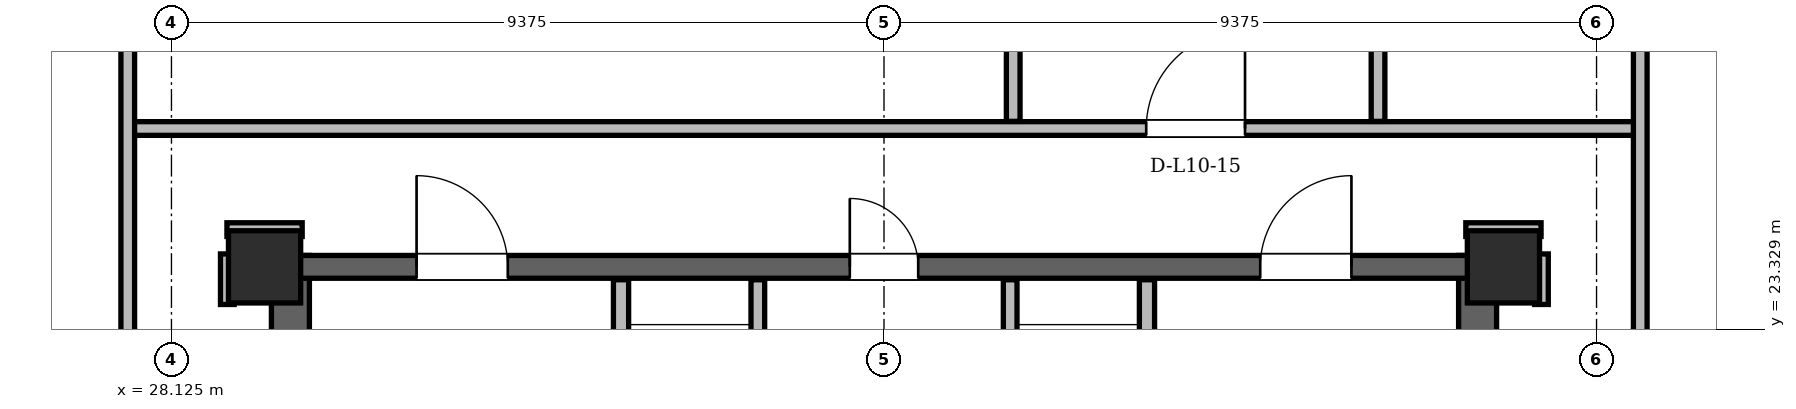
"""IFC4 building model, lengths in metres.
Left out: names, types, materials, properties, quantities, classifications, styles, units other than length and angle.
Written with IfcOpenShell. Run it as: python <this file> out.ifc"""

import sys

from ifc_helpers import new_model, si_unit, direction, frame, frame_2d, origin, origin_2d, place, context, subcontext, project, spatial, rectangle, hollow_rectangle, extrude, element, fill, save


model = new_model("IFC4")
c1 = context("Model", 3, precision=1e-05, world=origin(), true_north=direction((0.0, 1.0)))
c2 = subcontext(c1, "Body", "Model", "MODEL_VIEW")
j1 = project(units=[si_unit("LENGTHUNIT", "METRE"), si_unit("PLANEANGLEUNIT", "RADIAN")], contexts=[c1])
p1 = place(None, origin())
s1 = spatial("IfcSite", under=j1, at=p1, CompositionType="ELEMENT")
p2 = place(p1, origin())
s2 = spatial("IfcBuilding", under=s1, at=p2, CompositionType="ELEMENT")
p3 = place(p2, frame((0.0, 0.0, 41.7)))
s3 = spatial("IfcBuildingStorey", under=s2, at=p3, CompositionType="ELEMENT", Elevation=41.7)
for number, where, z_axis, x_axis in (
    (1, (45.65, 24.15, 0.0), (0.0, 0.0, 1.0), (1.0, 0.0, 0.0)),
    (2, (29.35, 24.15, 0.0), (0.0, 0.0, 1.0), (1.0, 0.0, 0.0)),
):
    element("IfcColumn", number, at=place(p3, frame(where, z_axis=z_axis, x_axis=x_axis)), inside=s3, PredefinedType="COLUMN", context=c2, shape_type="SweptSolid", body=[
        extrude(hollow_rectangle(XDim=0.95, YDim=0.95, WallThickness=0.08, at=origin_2d()), origin(), (0.0, 0.0, 1.0), 3.6),
    ])
for number, where, z_axis, x_axis in (
    (3, (29.69, 11.0, 0.0), (0.0, 0.0, 1.0), (0.0, 1.0, 0.0)),
    (4, (45.31, 11.0, 0.0), (0.0, 0.0, 1.0), (0.0, 1.0, 0.0)),
):
    element("IfcWall", number, at=place(p3, frame(where, z_axis=z_axis, x_axis=x_axis)), inside=s3, PredefinedType="SHEAR", context=c2, shape_type="SweptSolid", body=[
        extrude(rectangle(XDim=13.3, YDim=0.5, at=frame_2d((6.65, 0.0))), origin(), (0.0, 0.0, 1.0), 3.36),
    ])
p4 = place(p3, frame((29.65, 24.15, 0.0), z_axis=(0.0, 0.0, 1.0), x_axis=(1.0, 0.0, 0.0)))
e5 = element("IfcWall", 5, at=p4, inside=s3, PredefinedType="SHEAR", context=c2, shape_type="SweptSolid", body=[
    extrude(rectangle(XDim=15.7, YDim=0.3, at=frame_2d((7.85, 0.0))), origin(), (0.0, 0.0, 1.0), 3.36),
])
p5 = place(p4, frame((1.7, 0.0, 0.0)))
e6 = element("IfcOpeningElement", 6, at=p5, cuts=e5, PredefinedType="OPENING", context=c2, shape_type="SweptSolid", body=[
    extrude(rectangle(XDim=1.2, YDim=2.2, at=frame_2d((0.6, 1.1))), frame((0.0, 0.15, 0.0), z_axis=(0.0, -1.0, 0.0), x_axis=(1.0, 0.0, 0.0)), (0.0, 0.0, 1.0), 0.3),
])
p6 = place(p4, frame((12.8, 0.0, 0.0)))
e7 = element("IfcOpeningElement", 7, at=p6, cuts=e5, PredefinedType="OPENING", context=c2, shape_type="SweptSolid", body=[
    extrude(rectangle(XDim=1.2, YDim=2.2, at=frame_2d((0.6, 1.1))), frame((0.0, 0.15, 0.0), z_axis=(0.0, -1.0, 0.0), x_axis=(1.0, 0.0, 0.0)), (0.0, 0.0, 1.0), 0.3),
])
p7 = place(p4, frame((7.4, 0.0, 0.0)))
e8 = element("IfcOpeningElement", 8, at=p7, cuts=e5, PredefinedType="OPENING", context=c2, shape_type="SweptSolid", body=[
    extrude(rectangle(XDim=0.9, YDim=2.05, at=frame_2d((0.45, 1.025))), frame((0.0, 0.15, 0.0), z_axis=(0.0, -1.0, 0.0), x_axis=(1.0, 0.0, 0.0)), (0.0, 0.0, 1.0), 0.3),
])
p8 = place(p3, frame((61.648, 14.921, 0.0), z_axis=(0.0, 0.0, 1.0), x_axis=(-0.500002585961, 0.866023910774, 0.0)))
e9 = element("IfcWall", 9, at=p8, inside=s3, PredefinedType="SOLIDWALL", context=c2, shape_type="SweptSolid", body=[
    extrude(rectangle(XDim=33.118, YDim=0.34, at=frame_2d((16.559, 0.0))), origin(), (0.0, 0.0, 1.0), 2.494),
])
p9 = place(p8, frame((7.0, 0.0, 0.0)))
e10 = element("IfcOpeningElement", 10, at=p9, cuts=e9, PredefinedType="OPENING", context=c2, shape_type="SweptSolid", body=[
    extrude(rectangle(XDim=1.5, YDim=2.2, at=frame_2d((0.75, 1.1))), frame((0.0, 0.17, 0.0), z_axis=(0.0, -1.0, 0.0), x_axis=(1.0, 0.0, 0.0)), (0.0, 0.0, 1.0), 0.34),
])
p10 = place(p8, frame((24.004, 0.0, 0.0)))
e11 = element("IfcOpeningElement", 11, at=p10, cuts=e9, PredefinedType="OPENING", context=c2, shape_type="SweptSolid", body=[
    extrude(rectangle(XDim=1.5, YDim=2.2, at=frame_2d((0.75, 1.1))), frame((0.0, 0.17, 0.0), z_axis=(0.0, -1.0, 0.0), x_axis=(1.0, 0.0, 0.0)), (0.0, 0.0, 1.0), 0.34),
])
p11 = place(p8, frame((1.324, 0.0, 0.85)))
e12 = element("IfcOpeningElement", 12, at=p11, cuts=e9, PredefinedType="OPENING", context=c2, shape_type="SweptSolid", body=[
    extrude(rectangle(XDim=2.5, YDim=1.534, at=frame_2d((1.25, 0.767))), frame((0.0, 0.17, 0.0), z_axis=(0.0, -1.0, 0.0), x_axis=(1.0, 0.0, 0.0)), (0.0, 0.0, 1.0), 0.34),
])
p12 = place(p8, frame((17.011, 0.0, 0.85)))
e13 = element("IfcOpeningElement", 13, at=p12, cuts=e9, PredefinedType="OPENING", context=c2, shape_type="SweptSolid", body=[
    extrude(rectangle(XDim=2.8, YDim=1.534, at=frame_2d((1.4, 0.767))), frame((0.0, 0.17, 0.0), z_axis=(0.0, -1.0, 0.0), x_axis=(1.0, 0.0, 0.0)), (0.0, 0.0, 1.0), 0.34),
])
p13 = place(p8, frame((25.84, 0.0, 0.85)))
e14 = element("IfcOpeningElement", 14, at=p13, cuts=e9, PredefinedType="OPENING", context=c2, shape_type="SweptSolid", body=[
    extrude(rectangle(XDim=1.2, YDim=1.48, at=frame_2d((0.6, 0.74))), frame((0.0, 0.17, 0.0), z_axis=(0.0, -1.0, 0.0), x_axis=(1.0, 0.0, 0.0)), (0.0, 0.0, 1.0), 0.34),
])
p14 = place(p8, frame((10.758, 0.0, 0.85)))
e15 = element("IfcOpeningElement", 15, at=p14, cuts=e9, PredefinedType="OPENING", context=c2, shape_type="SweptSolid", body=[
    extrude(rectangle(XDim=1.2, YDim=1.48, at=frame_2d((0.6, 0.74))), frame((0.0, 0.17, 0.0), z_axis=(0.0, -1.0, 0.0), x_axis=(1.0, 0.0, 0.0)), (0.0, 0.0, 1.0), 0.34),
])
p15 = place(p8, frame((13.246, 0.0, 0.85)))
e16 = element("IfcOpeningElement", 16, at=p15, cuts=e9, PredefinedType="OPENING", context=c2, shape_type="SweptSolid", body=[
    extrude(rectangle(XDim=1.8, YDim=1.534, at=frame_2d((0.9, 0.767))), frame((0.0, 0.17, 0.0), z_axis=(0.0, -1.0, 0.0), x_axis=(1.0, 0.0, 0.0)), (0.0, 0.0, 1.0), 0.34),
])
p16 = place(p3, frame((29.911, 43.603, 0.0), z_axis=(0.0, 0.0, 1.0), x_axis=(-0.500002585961, -0.866023910774, 0.0)))
e17 = element("IfcWall", 17, at=p16, inside=s3, PredefinedType="SOLIDWALL", context=c2, shape_type="SweptSolid", body=[
    extrude(rectangle(XDim=33.118, YDim=0.34, at=frame_2d((16.559, 0.0))), origin(), (0.0, 0.0, 1.0), 2.494),
])
p17 = place(p16, frame((6.369, 0.0, 0.0)))
e18 = element("IfcOpeningElement", 18, at=p17, cuts=e17, PredefinedType="OPENING", context=c2, shape_type="SweptSolid", body=[
    extrude(rectangle(XDim=1.5, YDim=2.2, at=frame_2d((0.75, 1.1))), frame((0.0, 0.17, 0.0), z_axis=(0.0, -1.0, 0.0), x_axis=(1.0, 0.0, 0.0)), (0.0, 0.0, 1.0), 0.34),
])
p18 = place(p16, frame((25.574, 0.0, 0.0)))
e19 = element("IfcOpeningElement", 19, at=p18, cuts=e17, PredefinedType="OPENING", context=c2, shape_type="SweptSolid", body=[
    extrude(rectangle(XDim=1.3, YDim=2.2, at=frame_2d((0.65, 1.1))), frame((0.0, 0.17, 0.0), z_axis=(0.0, -1.0, 0.0), x_axis=(1.0, 0.0, 0.0)), (0.0, 0.0, 1.0), 0.34),
])
p19 = place(p16, frame((11.131, 0.0, 0.85)))
e20 = element("IfcOpeningElement", 20, at=p19, cuts=e17, PredefinedType="OPENING", context=c2, shape_type="SweptSolid", body=[
    extrude(rectangle(XDim=2.0, YDim=1.534, at=frame_2d((1.0, 0.767))), frame((0.0, 0.17, 0.0), z_axis=(0.0, -1.0, 0.0), x_axis=(1.0, 0.0, 0.0)), (0.0, 0.0, 1.0), 0.34),
])
p20 = place(p16, frame((18.613, 0.0, 0.85)))
e21 = element("IfcOpeningElement", 21, at=p20, cuts=e17, PredefinedType="OPENING", context=c2, shape_type="SweptSolid", body=[
    extrude(rectangle(XDim=1.4, YDim=1.534, at=frame_2d((0.7, 0.767))), frame((0.0, 0.17, 0.0), z_axis=(0.0, -1.0, 0.0), x_axis=(1.0, 0.0, 0.0)), (0.0, 0.0, 1.0), 0.34),
])
p21 = place(p16, frame((30.251, 0.0, 0.85)))
e22 = element("IfcOpeningElement", 22, at=p21, cuts=e17, PredefinedType="OPENING", context=c2, shape_type="SweptSolid", body=[
    extrude(rectangle(XDim=1.8, YDim=1.534, at=frame_2d((0.9, 0.767))), frame((0.0, 0.17, 0.0), z_axis=(0.0, -1.0, 0.0), x_axis=(1.0, 0.0, 0.0)), (0.0, 0.0, 1.0), 0.34),
])
p22 = place(p16, frame((28.524, 0.0, 0.85)))
e23 = element("IfcOpeningElement", 23, at=p22, cuts=e17, PredefinedType="OPENING", context=c2, shape_type="SweptSolid", body=[
    extrude(rectangle(XDim=1.2, YDim=1.48, at=frame_2d((0.6, 0.74))), frame((0.0, 0.17, 0.0), z_axis=(0.0, -1.0, 0.0), x_axis=(1.0, 0.0, 0.0)), (0.0, 0.0, 1.0), 0.34),
])
p23 = place(p3, frame((34.04, 19.48, 0.0), z_axis=(0.0, 0.0, 1.0), x_axis=(0.0, 1.0, 0.0)))
e24 = element("IfcWall", 24, at=p23, inside=s3, PredefinedType="PARTITIONING", context=c2, shape_type="SweptSolid", body=[
    extrude(rectangle(XDim=4.5, YDim=0.2, at=frame_2d((2.25, 0.0))), origin(), (0.0, 0.0, 1.0), 2.4),
])
p24 = place(p23, frame((2.12, 0.0, 0.0)))
e25 = element("IfcOpeningElement", 25, at=p24, cuts=e24, PredefinedType="OPENING", context=c2, shape_type="SweptSolid", body=[
    extrude(rectangle(XDim=1.1, YDim=2.2, at=frame_2d((0.55, 1.1))), frame((0.0, 0.1, 0.0), z_axis=(0.0, -1.0, 0.0), x_axis=(1.0, 0.0, 0.0)), (0.0, 0.0, 1.0), 0.2),
])
p25 = place(p3, frame((35.84, 20.96, 0.0), z_axis=(0.0, 0.0, 1.0), x_axis=(0.0, 1.0, 0.0)))
e26 = element("IfcWall", 26, at=p25, inside=s3, PredefinedType="PARTITIONING", context=c2, shape_type="SweptSolid", body=[
    extrude(rectangle(XDim=3.02, YDim=0.18, at=frame_2d((1.51, 0.0))), origin(), (0.0, 0.0, 1.0), 2.4),
])
p26 = place(p3, frame((40.96, 19.48, 0.0), z_axis=(0.0, 0.0, 1.0), x_axis=(0.0, 1.0, 0.0)))
e27 = element("IfcWall", 27, at=p26, inside=s3, PredefinedType="PARTITIONING", context=c2, shape_type="SweptSolid", body=[
    extrude(rectangle(XDim=4.5, YDim=0.2, at=frame_2d((2.25, 0.0))), origin(), (0.0, 0.0, 1.0), 2.4),
])
p27 = place(p26, frame((2.12, 0.0, 0.0)))
e28 = element("IfcOpeningElement", 28, at=p27, cuts=e27, PredefinedType="OPENING", context=c2, shape_type="SweptSolid", body=[
    extrude(rectangle(XDim=1.1, YDim=2.2, at=frame_2d((0.55, 1.1))), frame((0.0, 0.1, 0.0), z_axis=(0.0, -1.0, 0.0), x_axis=(1.0, 0.0, 0.0)), (0.0, 0.0, 1.0), 0.2),
])
p28 = place(p3, frame((39.16, 20.96, 0.0), z_axis=(0.0, 0.0, 1.0), x_axis=(0.0, 1.0, 0.0)))
e29 = element("IfcWall", 29, at=p28, inside=s3, PredefinedType="PARTITIONING", context=c2, shape_type="SweptSolid", body=[
    extrude(rectangle(XDim=3.02, YDim=0.18, at=frame_2d((1.51, 0.0))), origin(), (0.0, 0.0, 1.0), 2.4),
])
for number, where, z_axis, x_axis in (
    (30, (28.855, 24.64, 0.0), (0.0, 0.0, 1.0), (1.0, 0.0, 0.0)),
    (31, (45.155, 24.64, 0.0), (0.0, 0.0, 1.0), (1.0, 0.0, 0.0)),
):
    element("IfcWall", number, at=place(p3, frame(where, z_axis=z_axis, x_axis=x_axis)), inside=s3, PredefinedType="PARTITIONING", context=c2, shape_type="SweptSolid", body=[
        extrude(rectangle(XDim=0.99, YDim=0.18, at=frame_2d((0.495, 0.0))), origin(), (0.0, 0.0, 1.0), 2.738),
    ])
p29 = place(p3, frame((27.55, 25.97, 0.0), z_axis=(0.0, 0.0, 1.0), x_axis=(1.0, 0.0, 0.0)))
e32 = element("IfcWall", 32, at=p29, inside=s3, PredefinedType="PARTITIONING", context=c2, shape_type="SweptSolid", body=[
    extrude(rectangle(XDim=19.9, YDim=0.18, at=frame_2d((9.95, 0.0))), origin(), (0.0, 0.0, 1.0), 2.738),
])
p30 = place(p29, frame((13.4, 0.0, 0.0)))
e33 = element("IfcOpeningElement", 33, at=p30, cuts=e32, PredefinedType="OPENING", context=c2, shape_type="SweptSolid", body=[
    extrude(rectangle(XDim=1.3, YDim=2.2, at=frame_2d((0.65, 1.1))), frame((0.0, 0.09, 0.0), z_axis=(0.0, -1.0, 0.0), x_axis=(1.0, 0.0, 0.0)), (0.0, 0.0, 1.0), 0.18),
])
p31 = place(p3, frame((27.55, 11.044, 0.0), z_axis=(0.0, 0.0, 1.0), x_axis=(0.0, 1.0, 0.0)))
e34 = element("IfcWall", 34, at=p31, inside=s3, PredefinedType="PARTITIONING", context=c2, shape_type="SweptSolid", body=[
    extrude(rectangle(XDim=28.121, YDim=0.18, at=frame_2d((14.061, 0.0))), origin(), (0.0, 0.0, 1.0), 2.494),
])
p32 = place(p31, frame((8.121, 0.0, 0.0)))
e35 = element("IfcOpeningElement", 35, at=p32, cuts=e34, PredefinedType="OPENING", context=c2, shape_type="SweptSolid", body=[
    extrude(rectangle(XDim=1.0, YDim=2.18, at=frame_2d((0.5, 1.09))), frame((0.0, 0.09, 0.0), z_axis=(0.0, -1.0, 0.0), x_axis=(1.0, 0.0, 0.0)), (0.0, 0.0, 1.0), 0.18),
])
p33 = place(p3, frame((28.86, 23.655, 0.0), z_axis=(0.0, 0.0, 1.0), x_axis=(0.0, 1.0, 0.0)))
e36 = element("IfcWall", 36, at=p33, inside=s3, PredefinedType="PARTITIONING", context=c2, shape_type="SweptSolid", body=[
    extrude(rectangle(XDim=0.665, YDim=0.18, at=frame_2d((0.333, 0.0))), origin(), (0.0, 0.0, 1.0), 3.36),
])
p34 = place(p3, frame((39.2, 26.064, 0.0), z_axis=(0.0, 0.0, 1.0), x_axis=(0.0, 1.0, 0.0)))
e37 = element("IfcWall", 37, at=p34, inside=s3, PredefinedType="PARTITIONING", context=c2, shape_type="SweptSolid", body=[
    extrude(rectangle(XDim=4.312, YDim=0.18, at=frame_2d((2.156, 0.0))), origin(), (0.0, 0.0, 1.0), 3.36),
])
p35 = place(p3, frame((44.0, 26.064, 0.0), z_axis=(0.0, 0.0, 1.0), x_axis=(0.0, 1.0, 0.0)))
e38 = element("IfcWall", 38, at=p35, inside=s3, PredefinedType="PARTITIONING", context=c2, shape_type="SweptSolid", body=[
    extrude(rectangle(XDim=4.312, YDim=0.18, at=frame_2d((2.156, 0.0))), origin(), (0.0, 0.0, 1.0), 2.946),
])
p36 = place(p3, frame((46.15, 23.655, 0.0), z_axis=(0.0, 0.0, 1.0), x_axis=(0.0, 1.0, 0.0)))
e39 = element("IfcWall", 39, at=p36, inside=s3, PredefinedType="PARTITIONING", context=c2, shape_type="SweptSolid", body=[
    extrude(rectangle(XDim=0.665, YDim=0.18, at=frame_2d((0.333, 0.0))), origin(), (0.0, 0.0, 1.0), 3.36),
])
p37 = place(p3, frame((47.45, 11.044, 0.0), z_axis=(0.0, 0.0, 1.0), x_axis=(0.0, 1.0, 0.0)))
e40 = element("IfcWall", 40, at=p37, inside=s3, PredefinedType="PARTITIONING", context=c2, shape_type="SweptSolid", body=[
    extrude(rectangle(XDim=28.121, YDim=0.18, at=frame_2d((14.061, 0.0))), origin(), (0.0, 0.0, 1.0), 2.494),
])
p38 = place(p37, frame((10.822, 0.0, 0.0)))
e41 = element("IfcOpeningElement", 41, at=p38, cuts=e40, PredefinedType="OPENING", context=c2, shape_type="SweptSolid", body=[
    extrude(rectangle(XDim=1.0, YDim=2.18, at=frame_2d((0.5, 1.09))), frame((0.0, 0.09, 0.0), z_axis=(0.0, -1.0, 0.0), x_axis=(1.0, 0.0, 0.0)), (0.0, 0.0, 1.0), 0.18),
])
p39 = place(p5, origin())
e42 = element("IfcDoor", 42, at=p39, inside=s3, OperationType="SINGLE_SWING_LEFT", PredefinedType="DOOR", context=c2, shape_type="SweptSolid", body=[
    extrude(rectangle(XDim=1.2, YDim=2.2, at=frame_2d((0.6, 1.1))), frame((0.0, 0.025, 0.0), z_axis=(0.0, -1.0, 0.0), x_axis=(1.0, 0.0, 0.0)), (0.0, 0.0, 1.0), 0.05),
])
fill(e6, e42)
p40 = place(p6, origin())
e43 = element("IfcDoor", 43, at=p40, inside=s3, OperationType="SINGLE_SWING_RIGHT", PredefinedType="DOOR", context=c2, shape_type="SweptSolid", body=[
    extrude(rectangle(XDim=1.2, YDim=2.2, at=frame_2d((0.6, 1.1))), frame((0.0, 0.025, 0.0), z_axis=(0.0, -1.0, 0.0), x_axis=(1.0, 0.0, 0.0)), (0.0, 0.0, 1.0), 0.05),
])
fill(e7, e43)
p41 = place(p7, origin())
e44 = element("IfcDoor", 44, at=p41, inside=s3, OperationType="SINGLE_SWING_LEFT", PredefinedType="DOOR", context=c2, shape_type="SweptSolid", body=[
    extrude(rectangle(XDim=0.9, YDim=2.05, at=frame_2d((0.45, 1.025))), frame((0.0, 0.025, 0.0), z_axis=(0.0, -1.0, 0.0), x_axis=(1.0, 0.0, 0.0)), (0.0, 0.0, 1.0), 0.05),
])
fill(e8, e44)
p42 = place(p30, origin())
e45 = element("IfcDoor", 45, at=p42, inside=s3, OperationType="SINGLE_SWING_RIGHT", PredefinedType="DOOR", context=c2, shape_type="SweptSolid", body=[
    extrude(rectangle(XDim=1.3, YDim=2.2, at=frame_2d((0.65, 1.1))), frame((0.0, 0.025, 0.0), z_axis=(0.0, -1.0, 0.0), x_axis=(1.0, 0.0, 0.0)), (0.0, 0.0, 1.0), 0.05),
])
fill(e33, e45)
save(model, sys.argv[1])
